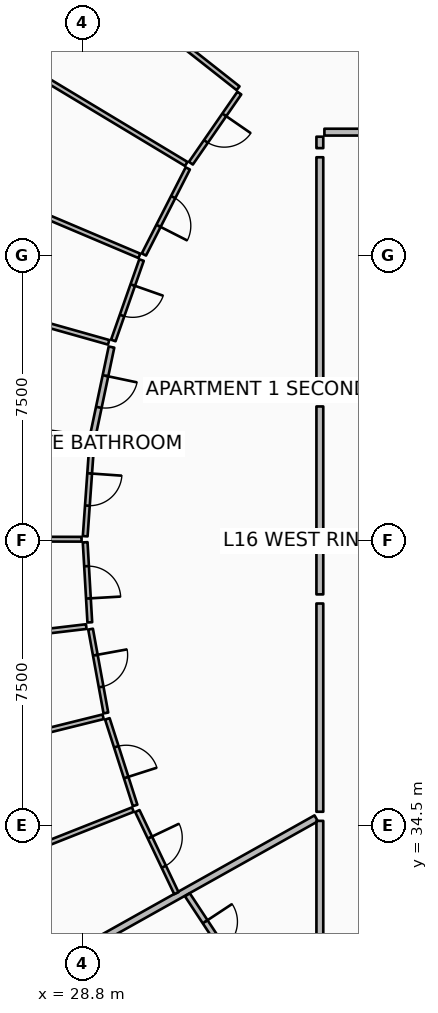
"""IFC4 building model, lengths in metres.
Left out: names, types, materials, properties, quantities, classifications, styles, units other than length and angle.
Written with IfcOpenShell. Run it as: python <this file> out.ifc"""

import sys

from ifc_helpers import new_model, si_unit, direction, frame, frame_2d, origin, place, context, subcontext, project, spatial, rectangle, extrude, element, fill, save


model = new_model("IFC4")
c1 = context("Model", 3, precision=1e-05, world=origin(), true_north=direction((0.0, 1.0)))
c2 = subcontext(c1, "Body", "Model", "MODEL_VIEW")
j1 = project(units=[si_unit("LENGTHUNIT", "METRE"), si_unit("PLANEANGLEUNIT", "RADIAN")], contexts=[c1])
p1 = place(None, origin())
s1 = spatial("IfcSite", under=j1, at=p1, CompositionType="ELEMENT")
p2 = place(p1, origin())
s2 = spatial("IfcBuilding", under=s1, at=p2, CompositionType="ELEMENT")
p3 = place(p2, frame((0.0, 0.0, 67.65)))
s3 = spatial("IfcBuildingStorey", under=s2, at=p3, CompositionType="ELEMENT", Elevation=67.65)
p4 = place(p3, frame((34.954, 34.694, 0.0), z_axis=(0.0, 0.0, 1.0), x_axis=(-0.872493465611, -0.488625779577, 0.0)))
e1 = element("IfcWall", 1, at=p4, inside=s3, PredefinedType="PARTITIONING", context=c2, shape_type="SweptSolid", body=[
    extrude(rectangle(XDim=16.586, YDim=0.18, at=frame_2d((8.293, 0.0))), origin(), (0.0, 0.0, 1.0), 2.717),
])
p5 = place(p3, frame((41.86, 52.75, 0.0), z_axis=(0.0, 0.0, 1.0), x_axis=(-1.0, 0.0, 0.0)))
e2 = element("IfcWall", 2, at=p5, inside=s3, PredefinedType="PARTITIONING", context=c2, shape_type="SweptSolid", body=[
    extrude(rectangle(XDim=6.69, YDim=0.18, at=frame_2d((3.345, 0.0))), origin(), (0.0, 0.0, 1.0), 2.717),
])
p6 = place(p5, frame((2.795, 0.0, 0.0)))
e3 = element("IfcOpeningElement", 3, at=p6, cuts=e2, PredefinedType="OPENING", context=c2, shape_type="SweptSolid", body=[
    extrude(rectangle(XDim=1.1, YDim=2.1, at=frame_2d((0.55, 1.05))), frame((0.0, 0.1, 0.0), z_axis=(0.0, -1.0, 0.0), x_axis=(1.0, 0.0, 0.0)), (0.0, 0.0, 1.0), 0.2),
])
p7 = place(p3, frame((35.05, 52.63, 0.0), z_axis=(0.0, 0.0, 1.0), x_axis=(0.0, -1.0, 0.0)))
e4 = element("IfcWall", 4, at=p7, inside=s3, PredefinedType="PARTITIONING", context=c2, shape_type="SweptSolid", body=[
    extrude(rectangle(XDim=0.301, YDim=0.18, at=frame_2d((0.15, 0.0))), origin(), (0.0, 0.0, 1.0), 2.717),
])
p8 = place(p3, frame((35.05, 52.089, 0.0), z_axis=(0.0, 0.0, 1.0), x_axis=(0.0, -1.0, 0.0)))
e5 = element("IfcWall", 5, at=p8, inside=s3, PredefinedType="PARTITIONING", context=c2, shape_type="SweptSolid", body=[
    extrude(rectangle(XDim=6.317, YDim=0.18, at=frame_2d((3.158, 0.0))), origin(), (0.0, 0.0, 1.0), 2.717),
])
p9 = place(p3, frame((32.898, 53.905, 0.0), z_axis=(0.0, 0.0, 1.0), x_axis=(-0.78532854108, 0.619079221558, 0.0)))
e6 = element("IfcWall", 6, at=p9, inside=s3, PredefinedType="PARTITIONING", context=c2, shape_type="SweptSolid", body=[
    extrude(rectangle(XDim=8.842, YDim=0.125, at=frame_2d((4.421, 0.0))), origin(), (0.0, 0.0, 1.0), 2.717),
])
p10 = place(p3, frame((31.534, 51.913, 0.0), z_axis=(0.0, 0.0, 1.0), x_axis=(-0.856706990958, 0.515803384676, 0.0)))
e7 = element("IfcWall", 7, at=p10, inside=s3, PredefinedType="PARTITIONING", context=c2, shape_type="SweptSolid", body=[
    extrude(rectangle(XDim=9.057, YDim=0.125, at=frame_2d((4.528, 0.0))), origin(), (0.0, 0.0, 1.0), 2.79),
])
p11 = place(p3, frame((30.301, 49.494, 0.0), z_axis=(0.0, 0.0, 1.0), x_axis=(-0.920840746031, 0.389938867579, 0.0)))
e8 = element("IfcWall", 8, at=p11, inside=s3, PredefinedType="PARTITIONING", context=c2, shape_type="SweptSolid", body=[
    extrude(rectangle(XDim=9.966, YDim=0.125, at=frame_2d((4.983, 0.0))), origin(), (0.0, 0.0, 1.0), 2.79),
])
p12 = place(p3, frame((32.931, 53.778, 0.0), z_axis=(0.0, 0.0, 1.0), x_axis=(-0.568541738061, -0.822654418382, 0.0)))
e9 = element("IfcWall", 9, at=p12, inside=s3, PredefinedType="PARTITIONING", context=c2, shape_type="SweptSolid", body=[
    extrude(rectangle(XDim=2.242, YDim=0.125, at=frame_2d((1.121, 0.0))), origin(), (0.0, 0.0, 1.0), 2.717),
])
p13 = place(p12, frame((0.696, 0.0, 0.0)))
e10 = element("IfcOpeningElement", 10, at=p13, cuts=e9, PredefinedType="OPENING", context=c2, shape_type="SweptSolid", body=[
    extrude(rectangle(XDim=0.85, YDim=2.06, at=frame_2d((0.425, 1.03))), frame((0.0, 0.073, 0.0), z_axis=(0.0, -1.0, 0.0), x_axis=(1.0, 0.0, 0.0)), (0.0, 0.0, 1.0), 0.145),
])
p14 = place(p3, frame((31.575, 51.796, 0.0), z_axis=(0.0, 0.0, 1.0), x_axis=(-0.454037986735, -0.890982326762, 0.0)))
e11 = element("IfcWall", 11, at=p14, inside=s3, PredefinedType="PARTITIONING", context=c2, shape_type="SweptSolid", body=[
    extrude(rectangle(XDim=2.542, YDim=0.125, at=frame_2d((1.271, 0.0))), origin(), (0.0, 0.0, 1.0), 2.79),
])
p15 = place(p14, frame((0.846, 0.0, 0.0)))
e12 = element("IfcOpeningElement", 12, at=p15, cuts=e11, PredefinedType="OPENING", context=c2, shape_type="SweptSolid", body=[
    extrude(rectangle(XDim=0.85, YDim=2.06, at=frame_2d((0.425, 1.03))), frame((0.0, 0.073, 0.0), z_axis=(0.0, -1.0, 0.0), x_axis=(1.0, 0.0, 0.0)), (0.0, 0.0, 1.0), 0.145),
])
p16 = place(p3, frame((30.358, 49.384, 0.0), z_axis=(0.0, 0.0, 1.0), x_axis=(-0.331344536708, -0.943509829304, 0.0)))
e13 = element("IfcWall", 13, at=p16, inside=s3, PredefinedType="PARTITIONING", context=c2, shape_type="SweptSolid", body=[
    extrude(rectangle(XDim=2.242, YDim=0.125, at=frame_2d((1.121, 0.0))), origin(), (0.0, 0.0, 1.0), 2.717),
])
p17 = place(p16, frame((0.696, 0.0, 0.0)))
e14 = element("IfcOpeningElement", 14, at=p17, cuts=e13, PredefinedType="OPENING", context=c2, shape_type="SweptSolid", body=[
    extrude(rectangle(XDim=0.85, YDim=2.06, at=frame_2d((0.425, 1.03))), frame((0.0, 0.073, 0.0), z_axis=(0.0, -1.0, 0.0), x_axis=(1.0, 0.0, 0.0)), (0.0, 0.0, 1.0), 0.145),
])
p18 = place(p3, frame((35.05, 45.532, 0.0), z_axis=(0.0, 0.0, 1.0), x_axis=(0.0, -1.0, 0.0)))
e15 = element("IfcWall", 15, at=p18, inside=s3, PredefinedType="PARTITIONING", context=c2, shape_type="SweptSolid", body=[
    extrude(rectangle(XDim=4.945, YDim=0.18, at=frame_2d((2.472, 0.0))), origin(), (0.0, 0.0, 1.0), 2.717),
])
p19 = place(p3, frame((29.492, 47.22, 0.0), z_axis=(0.0, 0.0, 1.0), x_axis=(-0.962454721813, 0.271442274635, 0.0)))
e16 = element("IfcWall", 16, at=p19, inside=s3, PredefinedType="PARTITIONING", context=c2, shape_type="SweptSolid", body=[
    extrude(rectangle(XDim=11.344, YDim=0.125, at=frame_2d((5.672, 0.0))), origin(), (0.0, 0.0, 1.0), 2.717),
])
p20 = place(p3, frame((29.568, 47.095, 0.0), z_axis=(0.0, 0.0, 1.0), x_axis=(-0.205861309483, -0.978581177654, 0.0)))
e17 = element("IfcWall", 17, at=p20, inside=s3, PredefinedType="PARTITIONING", context=c2, shape_type="SweptSolid", body=[
    extrude(rectangle(XDim=2.392, YDim=0.15, at=frame_2d((1.196, 0.0))), origin(), (0.0, 0.0, 1.0), 2.717),
])
p21 = place(p20, frame((0.771, 0.0, 0.0)))
e18 = element("IfcOpeningElement", 18, at=p21, cuts=e17, PredefinedType="OPENING", context=c2, shape_type="SweptSolid", body=[
    extrude(rectangle(XDim=0.85, YDim=2.06, at=frame_2d((0.425, 1.03))), frame((0.0, 0.085, 0.0), z_axis=(0.0, -1.0, 0.0), x_axis=(1.0, 0.0, 0.0)), (0.0, 0.0, 1.0), 0.17),
])
p22 = place(p3, frame((28.968, 44.678, 0.0), z_axis=(0.0, 0.0, 1.0), x_axis=(-0.990240767804, 0.139367219172, 0.0)))
e19 = element("IfcWall", 19, at=p22, inside=s3, PredefinedType="PARTITIONING", context=c2, shape_type="SweptSolid", body=[
    extrude(rectangle(XDim=4.46, YDim=0.15, at=frame_2d((2.23, 0.0))), origin(), (0.0, 0.0, 1.0), 2.79),
])
p23 = place(p3, frame((28.78, 42.038, 0.0), z_axis=(0.0, 0.0, 1.0), x_axis=(-0.999998036955, 0.001981435282, 0.0)))
e20 = element("IfcWall", 20, at=p23, inside=s3, PredefinedType="PARTITIONING", context=c2, shape_type="SweptSolid", body=[
    extrude(rectangle(XDim=12.075, YDim=0.125, at=frame_2d((6.038, 0.0))), origin(), (0.0, 0.0, 1.0), 2.79),
])
p24 = place(p3, frame((29.05, 44.576, 0.0), z_axis=(0.0, 0.0, 1.0), x_axis=(-0.070831673661, -0.997488282641, 0.0)))
e21 = element("IfcWall", 21, at=p24, inside=s3, PredefinedType="PARTITIONING", context=c2, shape_type="SweptSolid", body=[
    extrude(rectangle(XDim=2.464, YDim=0.125, at=frame_2d((1.232, 0.0))), origin(), (0.0, 0.0, 1.0), 2.79),
])
p25 = place(p24, frame((0.807, 0.0, 0.0)))
e22 = element("IfcOpeningElement", 22, at=p25, cuts=e21, PredefinedType="OPENING", context=c2, shape_type="SweptSolid", body=[
    extrude(rectangle(XDim=0.85, YDim=2.06, at=frame_2d((0.425, 1.03))), frame((0.0, 0.073, 0.0), z_axis=(0.0, -1.0, 0.0), x_axis=(1.0, 0.0, 0.0)), (0.0, 0.0, 1.0), 0.145),
])
p26 = place(p3, frame((28.875, 41.958, 0.0), z_axis=(0.0, 0.0, 1.0), x_axis=(0.057962417622, -0.998318765797, 0.0)))
e23 = element("IfcWall", 23, at=p26, inside=s3, PredefinedType="PARTITIONING", context=c2, shape_type="SweptSolid", body=[
    extrude(rectangle(XDim=2.11, YDim=0.125, at=frame_2d((1.055, 0.0))), origin(), (0.0, 0.0, 1.0), 2.717),
])
p27 = place(p26, frame((0.63, 0.0, 0.0)))
e24 = element("IfcOpeningElement", 24, at=p27, cuts=e23, PredefinedType="OPENING", context=c2, shape_type="SweptSolid", body=[
    extrude(rectangle(XDim=0.85, YDim=2.06, at=frame_2d((0.425, 1.03))), frame((0.0, 0.073, 0.0), z_axis=(0.0, -1.0, 0.0), x_axis=(1.0, 0.0, 0.0)), (0.0, 0.0, 1.0), 0.145),
])
p28 = place(p3, frame((35.05, 40.347, 0.0), z_axis=(0.0, 0.0, 1.0), x_axis=(0.0, -1.0, 0.0)))
e25 = element("IfcWall", 25, at=p28, inside=s3, PredefinedType="PARTITIONING", context=c2, shape_type="SweptSolid", body=[
    extrude(rectangle(XDim=5.48, YDim=0.18, at=frame_2d((2.74, 0.0))), origin(), (0.0, 0.0, 1.0), 2.717),
])
p29 = place(p3, frame((28.903, 39.74, 0.0), z_axis=(0.0, 0.0, 1.0), x_axis=(-0.993068040113, -0.117540919282, 0.0)))
e26 = element("IfcWall", 26, at=p29, inside=s3, PredefinedType="PARTITIONING", context=c2, shape_type="SweptSolid", body=[
    extrude(rectangle(XDim=12.309, YDim=0.125, at=frame_2d((6.154, 0.0))), origin(), (0.0, 0.0, 1.0), 2.717),
])
p30 = place(p3, frame((29.347, 37.366, 0.0), z_axis=(0.0, 0.0, 1.0), x_axis=(-0.970510462135, -0.241059002917, 0.0)))
e27 = element("IfcWall", 27, at=p30, inside=s3, PredefinedType="PARTITIONING", context=c2, shape_type="SweptSolid", body=[
    extrude(rectangle(XDim=11.79, YDim=0.125, at=frame_2d((5.895, 0.0))), origin(), (0.0, 0.0, 1.0), 2.79),
])
p31 = place(p3, frame((30.13, 34.925, 0.0), z_axis=(0.0, 0.0, 1.0), x_axis=(-0.929770978957, -0.368138461302, 0.0)))
e28 = element("IfcWall", 28, at=p31, inside=s3, PredefinedType="PARTITIONING", context=c2, shape_type="SweptSolid", body=[
    extrude(rectangle(XDim=11.773, YDim=0.125, at=frame_2d((5.887, 0.0))), origin(), (0.0, 0.0, 1.0), 2.79),
])
p32 = place(p3, frame((29.017, 39.673, 0.0), z_axis=(0.0, 0.0, 1.0), x_axis=(0.179632658462, -0.983733758704, 0.0)))
e29 = element("IfcWall", 29, at=p32, inside=s3, PredefinedType="PARTITIONING", context=c2, shape_type="SweptSolid", body=[
    extrude(rectangle(XDim=2.242, YDim=0.125, at=frame_2d((1.121, 0.0))), origin(), (0.0, 0.0, 1.0), 2.717),
])
p33 = place(p32, frame((0.696, 0.0, 0.0)))
e30 = element("IfcOpeningElement", 30, at=p33, cuts=e29, PredefinedType="OPENING", context=c2, shape_type="SweptSolid", body=[
    extrude(rectangle(XDim=0.85, YDim=2.06, at=frame_2d((0.425, 1.03))), frame((0.0, 0.073, 0.0), z_axis=(0.0, -1.0, 0.0), x_axis=(1.0, 0.0, 0.0)), (0.0, 0.0, 1.0), 0.145),
])
p34 = place(p3, frame((29.458, 37.312, 0.0), z_axis=(0.0, 0.0, 1.0), x_axis=(0.305338513131, -0.952243872335, 0.0)))
e31 = element("IfcWall", 31, at=p34, inside=s3, PredefinedType="PARTITIONING", context=c2, shape_type="SweptSolid", body=[
    extrude(rectangle(XDim=2.392, YDim=0.125, at=frame_2d((1.196, 0.0))), origin(), (0.0, 0.0, 1.0), 2.79),
])
p35 = place(p34, frame((0.771, 0.0, 0.0)))
e32 = element("IfcOpeningElement", 32, at=p35, cuts=e31, PredefinedType="OPENING", context=c2, shape_type="SweptSolid", body=[
    extrude(rectangle(XDim=0.85, YDim=2.06, at=frame_2d((0.425, 1.03))), frame((0.0, 0.073, 0.0), z_axis=(0.0, -1.0, 0.0), x_axis=(1.0, 0.0, 0.0)), (0.0, 0.0, 1.0), 0.145),
])
p36 = place(p3, frame((30.248, 34.885, 0.0), z_axis=(0.0, 0.0, 1.0), x_axis=(0.429366977128, -0.903130111862, 0.0)))
e33 = element("IfcWall", 33, at=p36, inside=s3, PredefinedType="PARTITIONING", context=c2, shape_type="SweptSolid", body=[
    extrude(rectangle(XDim=2.392, YDim=0.125, at=frame_2d((1.196, 0.0))), origin(), (0.0, 0.0, 1.0), 2.717),
])
p37 = place(p36, frame((0.771, 0.0, 0.0)))
e34 = element("IfcOpeningElement", 34, at=p37, cuts=e33, PredefinedType="OPENING", context=c2, shape_type="SweptSolid", body=[
    extrude(rectangle(XDim=0.85, YDim=2.06, at=frame_2d((0.425, 1.03))), frame((0.0, 0.073, 0.0), z_axis=(0.0, -1.0, 0.0), x_axis=(1.0, 0.0, 0.0)), (0.0, 0.0, 1.0), 0.145),
])
p38 = place(p3, frame((35.05, 34.628, 0.0), z_axis=(0.0, 0.0, 1.0), x_axis=(0.0, -1.0, 0.0)))
e35 = element("IfcWall", 35, at=p38, inside=s3, PredefinedType="PARTITIONING", context=c2, shape_type="SweptSolid", body=[
    extrude(rectangle(XDim=3.258, YDim=0.18, at=frame_2d((1.629, 0.0))), origin(), (0.0, 0.0, 1.0), 2.717),
])
p39 = place(p3, frame((31.565, 32.682, 0.0), z_axis=(0.0, 0.0, 1.0), x_axis=(0.550533618108, -0.834812994229, 0.0)))
e36 = element("IfcWall", 36, at=p39, inside=s3, PredefinedType="PARTITIONING", context=c2, shape_type="SweptSolid", body=[
    extrude(rectangle(XDim=2.546, YDim=0.15, at=frame_2d((1.273, 0.0))), origin(), (0.0, 0.0, 1.0), 2.717),
])
p40 = place(p39, frame((0.848, 0.0, 0.0)))
e37 = element("IfcOpeningElement", 37, at=p40, cuts=e36, PredefinedType="OPENING", context=c2, shape_type="SweptSolid", body=[
    extrude(rectangle(XDim=0.85, YDim=2.06, at=frame_2d((0.425, 1.03))), frame((0.0, 0.085, 0.0), z_axis=(0.0, -1.0, 0.0), x_axis=(1.0, 0.0, 0.0)), (0.0, 0.0, 1.0), 0.17),
])
p41 = place(p13, origin())
e38 = element("IfcDoor", 38, at=p41, inside=s3, OperationType="SINGLE_SWING_LEFT", PredefinedType="DOOR", context=c2, shape_type="SweptSolid", body=[
    extrude(rectangle(XDim=0.85, YDim=2.06, at=frame_2d((0.425, 1.03))), frame((0.0, 0.025, 0.0), z_axis=(0.0, -1.0, 0.0), x_axis=(1.0, 0.0, 0.0)), (0.0, 0.0, 1.0), 0.05),
])
fill(e10, e38)
p42 = place(p15, origin())
e39 = element("IfcDoor", 39, at=p42, inside=s3, OperationType="SINGLE_SWING_RIGHT", PredefinedType="DOOR", context=c2, shape_type="SweptSolid", body=[
    extrude(rectangle(XDim=0.85, YDim=2.06, at=frame_2d((0.425, 1.03))), frame((0.0, 0.025, 0.0), z_axis=(0.0, -1.0, 0.0), x_axis=(1.0, 0.0, 0.0)), (0.0, 0.0, 1.0), 0.05),
])
fill(e12, e39)
p43 = place(p17, origin())
e40 = element("IfcDoor", 40, at=p43, inside=s3, OperationType="SINGLE_SWING_LEFT", PredefinedType="DOOR", context=c2, shape_type="SweptSolid", body=[
    extrude(rectangle(XDim=0.85, YDim=2.06, at=frame_2d((0.425, 1.03))), frame((0.0, 0.025, 0.0), z_axis=(0.0, -1.0, 0.0), x_axis=(1.0, 0.0, 0.0)), (0.0, 0.0, 1.0), 0.05),
])
fill(e14, e40)
p44 = place(p21, origin())
e41 = element("IfcDoor", 41, at=p44, inside=s3, OperationType="SINGLE_SWING_LEFT", PredefinedType="DOOR", context=c2, shape_type="SweptSolid", body=[
    extrude(rectangle(XDim=0.85, YDim=2.06, at=frame_2d((0.425, 1.03))), frame((0.0, 0.025, 0.0), z_axis=(0.0, -1.0, 0.0), x_axis=(1.0, 0.0, 0.0)), (0.0, 0.0, 1.0), 0.05),
])
fill(e18, e41)
p45 = place(p25, origin())
e42 = element("IfcDoor", 42, at=p45, inside=s3, OperationType="SINGLE_SWING_LEFT", PredefinedType="DOOR", context=c2, shape_type="SweptSolid", body=[
    extrude(rectangle(XDim=0.85, YDim=2.06, at=frame_2d((0.425, 1.03))), frame((0.0, 0.025, 0.0), z_axis=(0.0, -1.0, 0.0), x_axis=(1.0, 0.0, 0.0)), (0.0, 0.0, 1.0), 0.05),
])
fill(e22, e42)
p46 = place(p27, origin())
e43 = element("IfcDoor", 43, at=p46, inside=s3, OperationType="SINGLE_SWING_RIGHT", PredefinedType="DOOR", context=c2, shape_type="SweptSolid", body=[
    extrude(rectangle(XDim=0.85, YDim=2.06, at=frame_2d((0.425, 1.03))), frame((0.0, 0.025, 0.0), z_axis=(0.0, -1.0, 0.0), x_axis=(1.0, 0.0, 0.0)), (0.0, 0.0, 1.0), 0.05),
])
fill(e24, e43)
p47 = place(p33, origin())
e44 = element("IfcDoor", 44, at=p47, inside=s3, OperationType="SINGLE_SWING_LEFT", PredefinedType="DOOR", context=c2, shape_type="SweptSolid", body=[
    extrude(rectangle(XDim=0.85, YDim=2.06, at=frame_2d((0.425, 1.03))), frame((0.0, 0.025, 0.0), z_axis=(0.0, -1.0, 0.0), x_axis=(1.0, 0.0, 0.0)), (0.0, 0.0, 1.0), 0.05),
])
fill(e30, e44)
p48 = place(p35, origin())
e45 = element("IfcDoor", 45, at=p48, inside=s3, OperationType="SINGLE_SWING_RIGHT", PredefinedType="DOOR", context=c2, shape_type="SweptSolid", body=[
    extrude(rectangle(XDim=0.85, YDim=2.06, at=frame_2d((0.425, 1.03))), frame((0.0, 0.025, 0.0), z_axis=(0.0, -1.0, 0.0), x_axis=(1.0, 0.0, 0.0)), (0.0, 0.0, 1.0), 0.05),
])
fill(e32, e45)
p49 = place(p37, origin())
e46 = element("IfcDoor", 46, at=p49, inside=s3, OperationType="SINGLE_SWING_LEFT", PredefinedType="DOOR", context=c2, shape_type="SweptSolid", body=[
    extrude(rectangle(XDim=0.85, YDim=2.06, at=frame_2d((0.425, 1.03))), frame((0.0, 0.025, 0.0), z_axis=(0.0, -1.0, 0.0), x_axis=(1.0, 0.0, 0.0)), (0.0, 0.0, 1.0), 0.05),
])
fill(e34, e46)
p50 = place(p40, origin())
e47 = element("IfcDoor", 47, at=p50, inside=s3, OperationType="SINGLE_SWING_LEFT", PredefinedType="DOOR", context=c2, shape_type="SweptSolid", body=[
    extrude(rectangle(XDim=0.85, YDim=2.06, at=frame_2d((0.425, 1.03))), frame((0.0, 0.025, 0.0), z_axis=(0.0, -1.0, 0.0), x_axis=(1.0, 0.0, 0.0)), (0.0, 0.0, 1.0), 0.05),
])
fill(e37, e47)
save(model, sys.argv[1])
